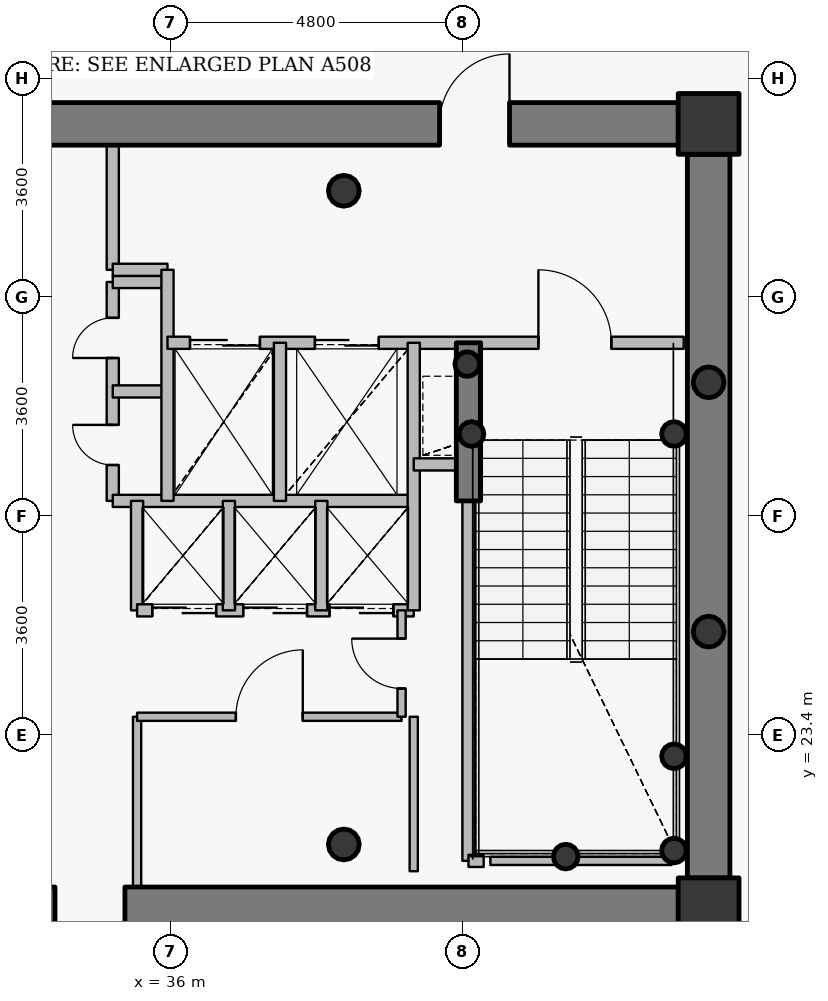
"""IFC4 building model, lengths in metres.
Left out: names, types, materials, properties, quantities, classifications, styles, units other than length and angle.
Written with IfcOpenShell. Run it as: python <this file> out.ifc"""

import sys

from ifc_helpers import new_model, si_unit, direction, frame, frame_2d, origin, origin_2d, place, context, subcontext, project, spatial, rectangle, hollow_circle, extrude, source, transform, mapped, element, fill, save


model = new_model("IFC4")
c1 = context("Model", 3, precision=1e-05, world=origin(), true_north=direction((0.0, 1.0)))
c2 = subcontext(c1, "Body", "Model", "MODEL_VIEW")
j1 = project(units=[si_unit("LENGTHUNIT", "METRE"), si_unit("PLANEANGLEUNIT", "RADIAN")], contexts=[c1])
p1 = place(None, origin())
s1 = spatial("IfcSite", under=j1, at=p1, CompositionType="ELEMENT")
p2 = place(p1, origin())
s2 = spatial("IfcBuilding", under=s1, at=p2, CompositionType="ELEMENT")
p3 = place(p2, frame((0.0, 0.0, 291.75)))
s3 = spatial("IfcBuildingStorey", under=s2, at=p3, CompositionType="ELEMENT", Elevation=291.75)
for number, where, z_axis, x_axis in (
    (1, (44.85, 20.55, 0.0), (0.0, 0.0, 1.0), (1.0, 0.0, 0.0)),
    (2, (44.85, 33.45, 0.0), (0.0, 0.0, 1.0), (1.0, 0.0, 0.0)),
):
    element("IfcColumn", number, at=place(p3, frame(where, z_axis=z_axis, x_axis=x_axis)), inside=s3, PredefinedType="COLUMN", context=c2, shape_type="SweptSolid", body=[
        extrude(rectangle(XDim=1.0, YDim=1.0, at=origin_2d()), origin(), (0.0, 0.0, 1.0), 3.75),
    ])
for number, where, z_axis, x_axis in (
    (3, (38.85, 21.6, 0.0), (0.0, 0.0, 1.0), (1.0, 0.0, 0.0)),
    (4, (38.85, 32.35, 0.0), (0.0, 0.0, 1.0), (1.0, 0.0, 0.0)),
):
    element("IfcColumn", number, at=place(p3, frame(where, z_axis=z_axis, x_axis=x_axis)), inside=s3, PredefinedType="COLUMN", context=c2, shape_type="SweptSolid", body=[
        extrude(hollow_circle(Radius=0.254, WallThickness=0.02, at=origin_2d()), origin(), (0.0, 0.0, 1.0), 3.75),
    ])
for number, where, z_axis, x_axis in (
    (5, (44.28, 21.5, 0.0), (0.0, 0.0, 1.0), (1.0, 0.0, 0.0)),
    (6, (44.28, 23.05, 0.0), (0.0, 0.0, 1.0), (1.0, 0.0, 0.0)),
    (7, (42.5, 21.4, 0.0), (0.0, 0.0, 1.0), (1.0, 0.0, 0.0)),
    (8, (40.95, 28.35, 0.0), (0.0, 0.0, 1.0), (1.0, 0.0, 0.0)),
    (9, (44.28, 28.35, 0.0), (0.0, 0.0, 1.0), (1.0, 0.0, 0.0)),
    (10, (40.88, 29.5, 0.0), (0.0, 0.0, 1.0), (1.0, 0.0, 0.0)),
):
    element("IfcColumn", number, at=place(p3, frame(where, z_axis=z_axis, x_axis=x_axis)), inside=s3, PredefinedType="COLUMN", context=c2, shape_type="SweptSolid", body=[
        extrude(hollow_circle(Radius=0.203, WallThickness=0.016, at=origin_2d()), origin(), (0.0, 0.0, 1.0), 3.75),
    ])
p4 = place(p3, frame((27.65, 33.45, 0.0), z_axis=(0.0, 0.0, 1.0), x_axis=(1.0, 0.0, 0.0)))
e11 = element("IfcWall", 11, at=p4, inside=s3, PredefinedType="SHEAR", context=c2, shape_type="SweptSolid", body=[
    extrude(rectangle(XDim=16.7, YDim=0.7, at=frame_2d((8.35, 0.0))), origin(), (0.0, 0.0, 1.0), 3.05),
])
p5 = place(p4, frame((12.775, 0.0, 0.0)))
e12 = element("IfcOpeningElement", 12, at=p5, cuts=e11, PredefinedType="OPENING", context=c2, shape_type="SweptSolid", body=[
    extrude(rectangle(XDim=1.15, YDim=2.15, at=origin_2d()), frame((0.575, 0.36, 1.075), z_axis=(0.0, -1.0, 0.0), x_axis=(1.0, 0.0, 0.0)), (0.0, 0.0, 1.0), 0.72),
])
p6 = place(p3, frame((44.85, 32.95, 0.0), z_axis=(0.0, 0.0, 1.0), x_axis=(0.0, -1.0, 0.0)))
e13 = element("IfcWall", 13, at=p6, inside=s3, PredefinedType="SHEAR", context=c2, shape_type="SweptSolid", body=[
    extrude(rectangle(XDim=11.9, YDim=0.7, at=frame_2d((5.95, 0.0))), origin(), (0.0, 0.0, 1.0), 3.05),
])
p7 = place(p3, frame((44.35, 20.55, 0.0), z_axis=(0.0, 0.0, 1.0), x_axis=(-1.0, 0.0, 0.0)))
e14 = element("IfcWall", 14, at=p7, inside=s3, PredefinedType="SHEAR", context=c2, shape_type="SweptSolid", body=[
    extrude(rectangle(XDim=16.7, YDim=0.7, at=frame_2d((8.35, 0.0))), origin(), (0.0, 0.0, 1.0), 3.05),
])
p8 = place(p7, frame((12.925, 0.0, 0.0)))
e15 = element("IfcOpeningElement", 15, at=p8, cuts=e14, PredefinedType="OPENING", context=c2, shape_type="SweptSolid", body=[
    extrude(rectangle(XDim=1.15, YDim=2.15, at=origin_2d()), frame((0.575, 0.36, 1.075), z_axis=(0.0, -1.0, 0.0), x_axis=(1.0, 0.0, 0.0)), (0.0, 0.0, 1.0), 0.72),
])
p9 = place(p7, frame((9.1, 0.0, 0.0)))
e16 = element("IfcOpeningElement", 16, at=p9, cuts=e14, PredefinedType="OPENING", context=c2, shape_type="SweptSolid", body=[
    extrude(rectangle(XDim=1.15, YDim=2.15, at=origin_2d()), frame((0.575, 0.36, 1.075), z_axis=(0.0, -1.0, 0.0), x_axis=(1.0, 0.0, 0.0)), (0.0, 0.0, 1.0), 0.72),
])
p10 = place(p3, frame((40.9, 27.25, 0.0), z_axis=(0.0, 0.0, 1.0), x_axis=(0.0, 1.0, 0.0)))
e17 = element("IfcWall", 17, at=p10, inside=s3, PredefinedType="SHEAR", context=c2, shape_type="SweptSolid", body=[
    extrude(rectangle(XDim=2.6, YDim=0.4, at=frame_2d((1.3, 0.0))), origin(), (0.0, 0.0, 1.0), 3.1),
])
for number, where, z_axis, x_axis in (
    (18, (44.85, 25.1, 0.0), (0.0, 0.0, 1.0), (1.0, 0.0, 0.0)),
    (19, (44.85, 29.2, 0.0), (0.0, 0.0, 1.0), (1.0, 0.0, 0.0)),
):
    element("IfcColumn", number, at=place(p3, frame(where, z_axis=z_axis, x_axis=x_axis)), inside=s3, PredefinedType="COLUMN", context=c2, shape_type="SweptSolid", body=[
        extrude(hollow_circle(Radius=0.254, WallThickness=0.02, at=origin_2d()), origin(), (0.0, 0.0, 1.0), 3.75),
    ])
p11 = place(p3, frame((35.05, 27.25, 0.0), z_axis=(0.0, 0.0, 1.0), x_axis=(0.0, 1.0, 0.0)))
e20 = element("IfcWall", 20, at=p11, inside=s3, PredefinedType="PARTITIONING", context=c2, shape_type="SweptSolid", body=[
    extrude(rectangle(XDim=3.6, YDim=0.2, at=frame_2d((1.8, 0.0))), origin(), (0.0, 0.0, 1.0), 3.5),
])
p12 = place(p11, frame((0.59, 0.0, 0.0)))
e21 = element("IfcOpeningElement", 21, at=p12, cuts=e20, PredefinedType="OPENING", context=c2, shape_type="SweptSolid", body=[
    extrude(rectangle(XDim=0.66, YDim=2.05, at=origin_2d()), frame((0.33, 0.11, 1.025), z_axis=(0.0, -1.0, 0.0), x_axis=(1.0, 0.0, 0.0)), (0.0, 0.0, 1.0), 0.22),
])
p13 = place(p11, frame((2.35, 0.0, 0.0)))
e22 = element("IfcOpeningElement", 22, at=p13, cuts=e20, PredefinedType="OPENING", context=c2, shape_type="SweptSolid", body=[
    extrude(rectangle(XDim=0.66, YDim=2.05, at=origin_2d()), frame((0.33, 0.11, 1.025), z_axis=(0.0, -1.0, 0.0), x_axis=(1.0, 0.0, 0.0)), (0.0, 0.0, 1.0), 0.22),
])
p14 = place(p3, frame((35.05, 27.25, 0.0), z_axis=(0.0, 0.0, 1.0), x_axis=(1.0, 0.0, 0.0)))
e23 = element("IfcWall", 23, at=p14, inside=s3, PredefinedType="PARTITIONING", context=c2, shape_type="SweptSolid", body=[
    extrude(rectangle(XDim=4.95, YDim=0.2, at=frame_2d((2.475, 0.0))), origin(), (0.0, 0.0, 1.0), 3.085),
])
for number, where, z_axis, x_axis in (
    (24, (35.05, 29.05, 0.0), (0.0, 0.0, 1.0), (1.0, 0.0, 0.0)),
    (25, (35.05, 30.85, 0.0), (0.0, 0.0, 1.0), (1.0, 0.0, 0.0)),
):
    element("IfcWall", number, at=place(p3, frame(where, z_axis=z_axis, x_axis=x_axis)), inside=s3, PredefinedType="PARTITIONING", context=c2, shape_type="SweptSolid", body=[
        extrude(rectangle(XDim=0.9, YDim=0.2, at=frame_2d((0.45, 0.0))), origin(), (0.0, 0.0, 1.0), 3.5),
    ])
p15 = place(p3, frame((35.05, 31.05, 0.0), z_axis=(0.0, 0.0, 1.0), x_axis=(0.0, 1.0, 0.0)))
e26 = element("IfcWall", 26, at=p15, inside=s3, PredefinedType="PARTITIONING", context=c2, shape_type="SweptSolid", body=[
    extrude(rectangle(XDim=2.05, YDim=0.2, at=frame_2d((1.025, 0.0))), origin(), (0.0, 0.0, 1.0), 3.085),
])
p16 = place(p3, frame((35.05, 31.05, 0.0), z_axis=(0.0, 0.0, 1.0), x_axis=(1.0, 0.0, 0.0)))
e27 = element("IfcWall", 27, at=p16, inside=s3, PredefinedType="PARTITIONING", context=c2, shape_type="SweptSolid", body=[
    extrude(rectangle(XDim=0.9, YDim=0.2, at=frame_2d((0.45, 0.0))), origin(), (0.0, 0.0, 1.0), 3.5),
])
p17 = place(p3, frame((35.45, 20.9, 0.0), z_axis=(0.0, 0.0, 1.0), x_axis=(0.0, 1.0, 0.0)))
e28 = element("IfcWall", 28, at=p17, inside=s3, PredefinedType="PARTITIONING", context=c2, shape_type="SweptSolid", body=[
    extrude(rectangle(XDim=2.8, YDim=0.135, at=frame_2d((1.4, 0.0))), origin(), (0.0, 0.0, 1.0), 3.085),
])
p18 = place(p3, frame((35.45, 23.7, 0.0), z_axis=(0.0, 0.0, 1.0), x_axis=(1.0, 0.0, 0.0)))
e29 = element("IfcWall", 29, at=p18, inside=s3, PredefinedType="PARTITIONING", context=c2, shape_type="SweptSolid", body=[
    extrude(rectangle(XDim=4.35, YDim=0.135, at=frame_2d((2.175, 0.0))), origin(), (0.0, 0.0, 1.0), 3.085),
])
p19 = place(p18, frame((1.625, 0.0, 0.0)))
e30 = element("IfcOpeningElement", 30, at=p19, cuts=e29, PredefinedType="OPENING", context=c2, shape_type="SweptSolid", body=[
    extrude(rectangle(XDim=1.1, YDim=2.15, at=origin_2d()), frame((0.55, 0.078, 1.075), z_axis=(0.0, -1.0, 0.0), x_axis=(1.0, 0.0, 0.0)), (0.0, 0.0, 1.0), 0.155),
])
p20 = place(p3, frame((35.45, 25.45, 0.0), z_axis=(0.0, 0.0, 1.0), x_axis=(0.0, 1.0, 0.0)))
e31 = element("IfcWall", 31, at=p20, inside=s3, PredefinedType="PARTITIONING", context=c2, shape_type="SweptSolid", body=[
    extrude(rectangle(XDim=1.8, YDim=0.2, at=frame_2d((0.9, 0.0))), origin(), (0.0, 0.0, 1.0), 3.5),
])
p21 = place(p3, frame((35.45, 25.45, 0.0), z_axis=(0.0, 0.0, 1.0), x_axis=(1.0, 0.0, 0.0)))
e32 = element("IfcWall", 32, at=p21, inside=s3, PredefinedType="PARTITIONING", context=c2, shape_type="SweptSolid", body=[
    extrude(rectangle(XDim=4.55, YDim=0.2, at=frame_2d((2.275, 0.0))), origin(), (0.0, 0.0, 1.0), 3.085),
])
p22 = place(p21, frame((0.25, 0.0, 0.0)))
e33 = element("IfcOpeningElement", 33, at=p22, cuts=e32, PredefinedType="OPENING", context=c2, shape_type="SweptSolid", body=[
    extrude(rectangle(XDim=1.05, YDim=2.15, at=origin_2d()), frame((0.525, 0.11, 1.075), z_axis=(0.0, -1.0, 0.0), x_axis=(1.0, 0.0, 0.0)), (0.0, 0.0, 1.0), 0.22),
])
p23 = place(p21, frame((1.745, 0.0, 0.0)))
e34 = element("IfcOpeningElement", 34, at=p23, cuts=e32, PredefinedType="OPENING", context=c2, shape_type="SweptSolid", body=[
    extrude(rectangle(XDim=1.05, YDim=2.15, at=origin_2d()), frame((0.525, 0.11, 1.075), z_axis=(0.0, -1.0, 0.0), x_axis=(1.0, 0.0, 0.0)), (0.0, 0.0, 1.0), 0.22),
])
p24 = place(p21, frame((3.165, 0.0, 0.0)))
e35 = element("IfcOpeningElement", 35, at=p24, cuts=e32, PredefinedType="OPENING", context=c2, shape_type="SweptSolid", body=[
    extrude(rectangle(XDim=1.05, YDim=2.15, at=origin_2d()), frame((0.525, 0.11, 1.075), z_axis=(0.0, -1.0, 0.0), x_axis=(1.0, 0.0, 0.0)), (0.0, 0.0, 1.0), 0.22),
])
p25 = place(p3, frame((35.95, 27.25, 0.0), z_axis=(0.0, 0.0, 1.0), x_axis=(0.0, 1.0, 0.0)))
e36 = element("IfcWall", 36, at=p25, inside=s3, PredefinedType="PARTITIONING", context=c2, shape_type="SweptSolid", body=[
    extrude(rectangle(XDim=3.8, YDim=0.2, at=frame_2d((1.9, 0.0))), origin(), (0.0, 0.0, 1.0), 3.5),
])
p26 = place(p3, frame((35.95, 29.85, 0.0), z_axis=(0.0, 0.0, 1.0), x_axis=(1.0, 0.0, 0.0)))
e37 = element("IfcWall", 37, at=p26, inside=s3, PredefinedType="PARTITIONING", context=c2, shape_type="SweptSolid", body=[
    extrude(rectangle(XDim=8.49, YDim=0.2, at=frame_2d((4.245, 0.0))), origin(), (0.0, 0.0, 1.0), 3.085),
])
p27 = place(p26, frame((6.1, 0.0, 0.0)))
e38 = element("IfcOpeningElement", 38, at=p27, cuts=e37, PredefinedType="OPENING", context=c2, shape_type="SweptSolid", body=[
    extrude(rectangle(XDim=1.2, YDim=2.15, at=origin_2d()), frame((0.6, 0.11, 1.075), z_axis=(0.0, -1.0, 0.0), x_axis=(1.0, 0.0, 0.0)), (0.0, 0.0, 1.0), 0.22),
])
p28 = place(p26, frame((0.37, 0.0, 0.0)))
e39 = element("IfcOpeningElement", 39, at=p28, cuts=e37, PredefinedType="OPENING", context=c2, shape_type="SweptSolid", body=[
    extrude(rectangle(XDim=1.15, YDim=2.15, at=origin_2d()), frame((0.575, 0.11, 1.075), z_axis=(0.0, -1.0, 0.0), x_axis=(1.0, 0.0, 0.0)), (0.0, 0.0, 1.0), 0.22),
])
p29 = place(p26, frame((2.425, 0.0, 0.0)))
e40 = element("IfcOpeningElement", 40, at=p29, cuts=e37, PredefinedType="OPENING", context=c2, shape_type="SweptSolid", body=[
    extrude(rectangle(XDim=1.05, YDim=2.15, at=origin_2d()), frame((0.525, 0.11, 1.075), z_axis=(0.0, -1.0, 0.0), x_axis=(1.0, 0.0, 0.0)), (0.0, 0.0, 1.0), 0.22),
])
p30 = place(p3, frame((36.96, 25.45, 0.0), z_axis=(0.0, 0.0, 1.0), x_axis=(0.0, 1.0, 0.0)))
e41 = element("IfcWall", 41, at=p30, inside=s3, PredefinedType="PARTITIONING", context=c2, shape_type="SweptSolid", body=[
    extrude(rectangle(XDim=1.8, YDim=0.2, at=frame_2d((0.9, 0.0))), origin(), (0.0, 0.0, 1.0), 3.5),
])
p31 = place(p3, frame((37.8, 27.25, 0.0), z_axis=(0.0, 0.0, 1.0), x_axis=(0.0, 1.0, 0.0)))
e42 = element("IfcWall", 42, at=p31, inside=s3, PredefinedType="PARTITIONING", context=c2, shape_type="SweptSolid", body=[
    extrude(rectangle(XDim=2.6, YDim=0.2, at=frame_2d((1.3, 0.0))), origin(), (0.0, 0.0, 1.0), 3.5),
])
p32 = place(p3, frame((38.48, 25.45, 0.0), z_axis=(0.0, 0.0, 1.0), x_axis=(0.0, 1.0, 0.0)))
e43 = element("IfcWall", 43, at=p32, inside=s3, PredefinedType="PARTITIONING", context=c2, shape_type="SweptSolid", body=[
    extrude(rectangle(XDim=1.8, YDim=0.2, at=frame_2d((0.9, 0.0))), origin(), (0.0, 0.0, 1.0), 3.5),
])
p33 = place(p3, frame((39.8, 23.7, 0.0), z_axis=(0.0, 0.0, 1.0), x_axis=(0.0, 1.0, 0.0)))
e44 = element("IfcWall", 44, at=p33, inside=s3, PredefinedType="PARTITIONING", context=c2, shape_type="SweptSolid", body=[
    extrude(rectangle(XDim=1.75, YDim=0.135, at=frame_2d((0.875, 0.0))), origin(), (0.0, 0.0, 1.0), 3.5),
])
p34 = place(p33, frame((0.465, 0.0, 0.0)))
e45 = element("IfcOpeningElement", 45, at=p34, cuts=e44, PredefinedType="OPENING", context=c2, shape_type="SweptSolid", body=[
    extrude(rectangle(XDim=0.82, YDim=2.1, at=origin_2d()), frame((0.41, 0.078, 1.05), z_axis=(0.0, -1.0, 0.0), x_axis=(1.0, 0.0, 0.0)), (0.0, 0.0, 1.0), 0.155),
])
p35 = place(p3, frame((40.0, 25.45, 0.0), z_axis=(0.0, 0.0, 1.0), x_axis=(0.0, 1.0, 0.0)))
e46 = element("IfcWall", 46, at=p35, inside=s3, PredefinedType="PARTITIONING", context=c2, shape_type="SweptSolid", body=[
    extrude(rectangle(XDim=4.4, YDim=0.2, at=frame_2d((2.2, 0.0))), origin(), (0.0, 0.0, 1.0), 3.5),
])
p36 = place(p3, frame((40.0, 27.85, 0.0), z_axis=(0.0, 0.0, 1.0), x_axis=(1.0, 0.0, 0.0)))
e47 = element("IfcWall", 47, at=p36, inside=s3, PredefinedType="PARTITIONING", context=c2, shape_type="SweptSolid", body=[
    extrude(rectangle(XDim=0.9, YDim=0.2, at=frame_2d((0.45, 0.0))), origin(), (0.0, 0.0, 1.0), 3.5),
])
p37 = place(p3, frame((40.9, 21.33, 0.0), z_axis=(0.0, 0.0, 1.0), x_axis=(0.0, 1.0, 0.0)))
e48 = element("IfcWall", 48, at=p37, inside=s3, PredefinedType="PARTITIONING", context=c2, shape_type="SweptSolid", body=[
    extrude(rectangle(XDim=5.91, YDim=0.2, at=frame_2d((2.955, 0.0))), origin(), (0.0, 0.0, 1.0), 3.035),
])
p38 = place(p3, frame((40.9, 21.33, 0.0), z_axis=(0.0, 0.0, 1.0), x_axis=(1.0, 0.0, 0.0)))
e49 = element("IfcWall", 49, at=p38, inside=s3, PredefinedType="PARTITIONING", context=c2, shape_type="SweptSolid", body=[
    extrude(rectangle(XDim=0.25, YDim=0.2, at=frame_2d((0.125, 0.0))), origin(), (0.0, 0.0, 1.0), 3.035),
])
p39 = place(p3, frame((44.24, 21.33, 0.0), z_axis=(0.0, 0.0, 1.0), x_axis=(-1.0, 0.0, 0.0)))
e50 = element("IfcWall", 50, at=p39, inside=s3, PredefinedType="PARTITIONING", context=c2, shape_type="SweptSolid", body=[
    extrude(rectangle(XDim=2.98, YDim=0.135, at=frame_2d((1.49, 0.0))), origin(), (0.0, 0.0, 1.0), 3.035),
])
p40 = place(p3, frame((40.0, 23.7, 0.0), z_axis=(0.0, 0.0, 1.0), x_axis=(0.0, -1.0, 0.0)))
e51 = element("IfcWall", 51, at=p40, inside=s3, PredefinedType="PARTITIONING", context=c2, shape_type="SweptSolid", body=[
    extrude(rectangle(XDim=2.54, YDim=0.135, at=frame_2d((1.27, 0.0))), origin(), (0.0, 0.0, 1.0), 3.035),
])
p41 = place(p3, frame((45.2, 33.8, 0.0), z_axis=(0.0, 0.0, 1.0), x_axis=(-1.0, 0.0, 0.0)))
e52 = element("IfcWall", 52, at=p41, inside=s3, PredefinedType="PARTITIONING", context=c2, shape_type="SweptSolid", body=[
    extrude(rectangle(XDim=0.84, YDim=0.135, at=frame_2d((0.42, 0.0))), origin(), (0.0, 0.0, 1.0), 3.035),
])
for number, where, z_axis, x_axis in (
    (53, (45.2, 20.508, 0.0), (0.0, 0.0, 1.0), (0.0, 1.0, 0.0)),
    (54, (45.2, 32.96, 0.0), (0.0, 0.0, 1.0), (0.0, 1.0, 0.0)),
):
    element("IfcWall", number, at=place(p3, frame(where, z_axis=z_axis, x_axis=x_axis)), inside=s3, PredefinedType="PARTITIONING", context=c2, shape_type="SweptSolid", body=[
        extrude(rectangle(XDim=0.532, YDim=0.135, at=frame_2d((0.266, 0.0))), origin(), (0.0, 0.0, 1.0), 3.5),
    ])
m1 = source(origin(), c2, "Body", "SweptSolid", [
    extrude(rectangle(XDim=1.15, YDim=2.15, at=origin_2d()), frame((0.575, 0.025, 1.075), z_axis=(0.0, -1.0, 0.0), x_axis=(1.0, 0.0, 0.0)), (0.0, 0.0, 1.0), 0.05),
])
p42 = place(p5, origin())
e55 = element("IfcDoor", 55, at=p42, inside=s3, OperationType="SINGLE_SWING_RIGHT", PredefinedType="DOOR", context=c2, shape_type="MappedRepresentation", body=[
    mapped(m1, transform((0.0, 0.0, 0.0), x_axis=(1.0, 0.0, 0.0), y_axis=(0.0, 1.0, 0.0), z_axis=(0.0, 0.0, 1.0), scale=1.0)),
])
fill(e12, e55)
p43 = place(p9, origin())
e56 = element("IfcDoor", 56, at=p43, inside=s3, OperationType="SINGLE_SWING_LEFT", PredefinedType="DOOR", context=c2, shape_type="MappedRepresentation", body=[
    mapped(m1, transform((0.0, 0.0, 0.0), x_axis=(1.0, 0.0, 0.0), y_axis=(0.0, 1.0, 0.0), z_axis=(0.0, 0.0, 1.0), scale=1.0)),
])
fill(e16, e56)
m2 = source(origin(), c2, "Body", "SweptSolid", [
    extrude(rectangle(XDim=1.2, YDim=2.15, at=origin_2d()), frame((0.6, 0.025, 1.075), z_axis=(0.0, -1.0, 0.0), x_axis=(1.0, 0.0, 0.0)), (0.0, 0.0, 1.0), 0.05),
])
p44 = place(p27, origin())
e57 = element("IfcDoor", 57, at=p44, inside=s3, OperationType="SINGLE_SWING_LEFT", PredefinedType="DOOR", context=c2, shape_type="MappedRepresentation", body=[
    mapped(m2, transform((0.0, 0.0, 0.0), x_axis=(1.0, 0.0, 0.0), y_axis=(0.0, 1.0, 0.0), z_axis=(0.0, 0.0, 1.0), scale=1.0)),
])
fill(e38, e57)
m3 = source(origin(), c2, "Body", "SweptSolid", [
    extrude(rectangle(XDim=1.15, YDim=2.15, at=origin_2d()), frame((0.575, 0.025, 1.075), z_axis=(0.0, -1.0, 0.0), x_axis=(1.0, 0.0, 0.0)), (0.0, 0.0, 1.0), 0.05),
])
p45 = place(p28, origin())
e58 = element("IfcDoor", 58, at=p45, inside=s3, OperationType="DOUBLE_DOOR_SLIDING", PredefinedType="USERDEFINED", context=c2, shape_type="MappedRepresentation", body=[
    mapped(m3, transform((0.0, 0.0, 0.0), x_axis=(1.0, 0.0, 0.0), y_axis=(0.0, 1.0, 0.0), z_axis=(0.0, 0.0, 1.0), scale=1.0)),
])
fill(e39, e58)
m4 = source(origin(), c2, "Body", "SweptSolid", [
    extrude(rectangle(XDim=1.05, YDim=2.15, at=origin_2d()), frame((0.525, 0.025, 1.075), z_axis=(0.0, -1.0, 0.0), x_axis=(1.0, 0.0, 0.0)), (0.0, 0.0, 1.0), 0.05),
])
p46 = place(p29, origin())
e59 = element("IfcDoor", 59, at=p46, inside=s3, OperationType="DOUBLE_DOOR_SLIDING", PredefinedType="USERDEFINED", context=c2, shape_type="MappedRepresentation", body=[
    mapped(m4, transform((0.0, 0.0, 0.0), x_axis=(1.0, 0.0, 0.0), y_axis=(0.0, 1.0, 0.0), z_axis=(0.0, 0.0, 1.0), scale=1.0)),
])
fill(e40, e59)
p47 = place(p22, origin())
e60 = element("IfcDoor", 60, at=p47, inside=s3, OperationType="DOUBLE_DOOR_SLIDING", PredefinedType="USERDEFINED", context=c2, shape_type="MappedRepresentation", body=[
    mapped(m4, transform((0.0, 0.0, 0.0), x_axis=(1.0, 0.0, 0.0), y_axis=(0.0, 1.0, 0.0), z_axis=(0.0, 0.0, 1.0), scale=1.0)),
])
fill(e33, e60)
p48 = place(p23, origin())
e61 = element("IfcDoor", 61, at=p48, inside=s3, OperationType="DOUBLE_DOOR_SLIDING", PredefinedType="USERDEFINED", context=c2, shape_type="MappedRepresentation", body=[
    mapped(m4, transform((0.0, 0.0, 0.0), x_axis=(1.0, 0.0, 0.0), y_axis=(0.0, 1.0, 0.0), z_axis=(0.0, 0.0, 1.0), scale=1.0)),
])
fill(e34, e61)
p49 = place(p24, origin())
e62 = element("IfcDoor", 62, at=p49, inside=s3, OperationType="DOUBLE_DOOR_SLIDING", PredefinedType="USERDEFINED", context=c2, shape_type="MappedRepresentation", body=[
    mapped(m4, transform((0.0, 0.0, 0.0), x_axis=(1.0, 0.0, 0.0), y_axis=(0.0, 1.0, 0.0), z_axis=(0.0, 0.0, 1.0), scale=1.0)),
])
fill(e35, e62)
m5 = source(origin(), c2, "Body", "SweptSolid", [
    extrude(rectangle(XDim=0.66, YDim=2.05, at=origin_2d()), frame((0.33, 0.025, 1.025), z_axis=(0.0, -1.0, 0.0), x_axis=(1.0, 0.0, 0.0)), (0.0, 0.0, 1.0), 0.05),
])
p50 = place(p12, origin())
e63 = element("IfcDoor", 63, at=p50, inside=s3, OperationType="SINGLE_SWING_RIGHT", PredefinedType="USERDEFINED", context=c2, shape_type="MappedRepresentation", body=[
    mapped(m5, transform((0.0, 0.0, 0.0), x_axis=(1.0, 0.0, 0.0), y_axis=(0.0, 1.0, 0.0), z_axis=(0.0, 0.0, 1.0), scale=1.0)),
])
fill(e21, e63)
p51 = place(p13, origin())
e64 = element("IfcDoor", 64, at=p51, inside=s3, OperationType="SINGLE_SWING_LEFT", PredefinedType="USERDEFINED", context=c2, shape_type="MappedRepresentation", body=[
    mapped(m5, transform((0.0, 0.0, 0.0), x_axis=(1.0, 0.0, 0.0), y_axis=(0.0, 1.0, 0.0), z_axis=(0.0, 0.0, 1.0), scale=1.0)),
])
fill(e22, e64)
m6 = source(origin(), c2, "Body", "SweptSolid", [
    extrude(rectangle(XDim=1.1, YDim=2.15, at=origin_2d()), frame((0.55, 0.025, 1.075), z_axis=(0.0, -1.0, 0.0), x_axis=(1.0, 0.0, 0.0)), (0.0, 0.0, 1.0), 0.05),
])
p52 = place(p19, origin())
e65 = element("IfcDoor", 65, at=p52, inside=s3, OperationType="SINGLE_SWING_RIGHT", PredefinedType="DOOR", context=c2, shape_type="MappedRepresentation", body=[
    mapped(m6, transform((0.0, 0.0, 0.0), x_axis=(1.0, 0.0, 0.0), y_axis=(0.0, 1.0, 0.0), z_axis=(0.0, 0.0, 1.0), scale=1.0)),
])
fill(e30, e65)
m7 = source(origin(), c2, "Body", "SweptSolid", [
    extrude(rectangle(XDim=0.82, YDim=2.1, at=origin_2d()), frame((0.41, 0.025, 1.05), z_axis=(0.0, -1.0, 0.0), x_axis=(1.0, 0.0, 0.0)), (0.0, 0.0, 1.0), 0.05),
])
p53 = place(p34, origin())
e66 = element("IfcDoor", 66, at=p53, inside=s3, OperationType="SINGLE_SWING_RIGHT", PredefinedType="DOOR", context=c2, shape_type="MappedRepresentation", body=[
    mapped(m7, transform((0.0, 0.0, 0.0), x_axis=(1.0, 0.0, 0.0), y_axis=(0.0, 1.0, 0.0), z_axis=(0.0, 0.0, 1.0), scale=1.0)),
])
fill(e45, e66)
save(model, sys.argv[1])
